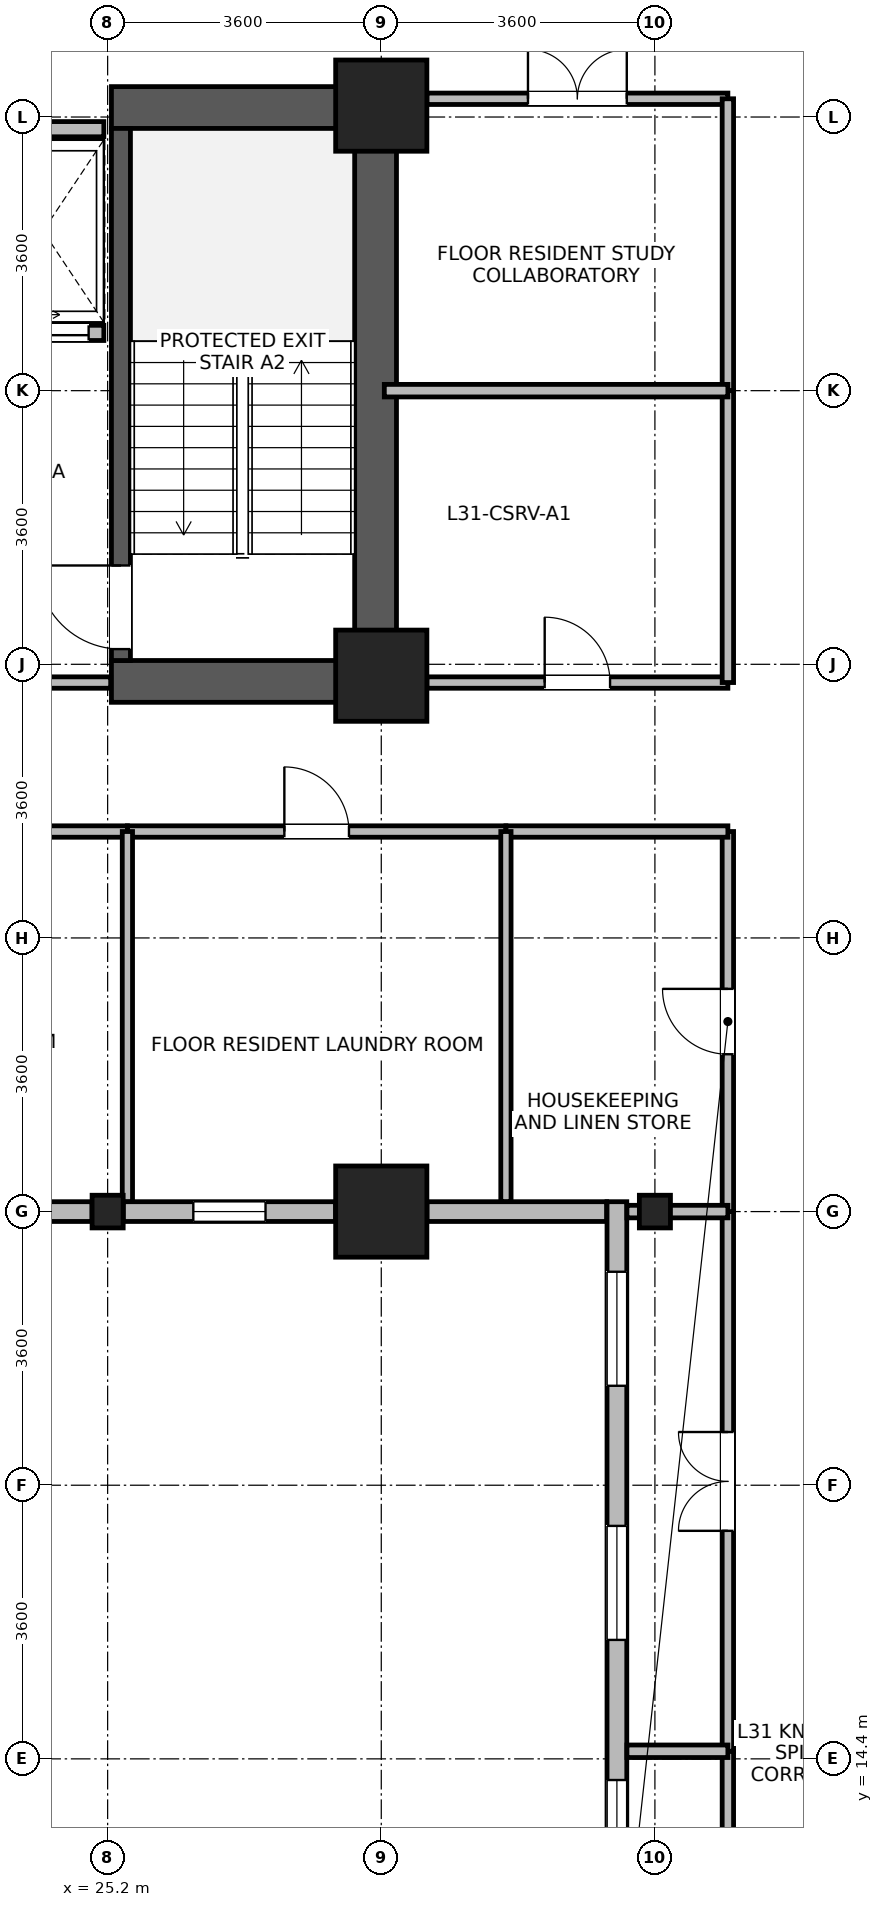
"""IFC4 building model, lengths in metres.
Left out: names, types, materials, properties, quantities, classifications, styles, units other than length and angle.
Written with IfcOpenShell. Run it as: python <this file> out.ifc"""

import sys

from ifc_helpers import new_model, si_unit, direction, frame, frame_2d, origin, origin_2d, place, context, subcontext, project, spatial, rectangle, i_section, extrude, source, transform, mapped, element, fill, save


model = new_model("IFC4")
c1 = context("Model", 3, precision=1e-05, world=origin(), true_north=direction((0.0, 1.0)))
c2 = subcontext(c1, "Body", "Model", "MODEL_VIEW")
j1 = project(units=[si_unit("LENGTHUNIT", "METRE"), si_unit("PLANEANGLEUNIT", "RADIAN")], contexts=[c1])
p1 = place(None, origin())
s1 = spatial("IfcSite", under=j1, at=p1, CompositionType="ELEMENT")
p2 = place(p1, origin())
s2 = spatial("IfcBuilding", under=s1, at=p2, CompositionType="ELEMENT")
p3 = place(p2, frame((0.0, 0.0, 123.0)))
s3 = spatial("IfcBuildingStorey", under=s2, at=p3, CompositionType="ELEMENT", Elevation=123.0)
p4 = place(p3, frame((28.725, 28.3, 0.0), z_axis=(0.0, 0.0, 1.0), x_axis=(0.0, 1.0, 0.0)))
e1 = element("IfcWall", 1, at=p4, inside=s3, PredefinedType="SHEAR", context=c2, shape_type="SweptSolid", body=[
    extrude(rectangle(XDim=8.1, YDim=0.55, at=frame_2d((4.05, 0.0))), origin(), (0.0, 0.0, 1.0), 3.45),
])
for number, where, z_axis, x_axis in (
    (2, (25.25, 28.575, 0.0), (0.0, 0.0, 1.0), (1.0, 0.0, 0.0)),
    (3, (25.25, 36.125, 0.0), (0.0, 0.0, 1.0), (1.0, 0.0, 0.0)),
):
    element("IfcWall", number, at=place(p3, frame(where, z_axis=z_axis, x_axis=x_axis)), inside=s3, PredefinedType="SHEAR", context=c2, shape_type="SweptSolid", body=[
        extrude(rectangle(XDim=3.2, YDim=0.55, at=frame_2d((1.6, 0.0))), origin(), (0.0, 0.0, 1.0), 3.45),
    ])
p5 = place(p3, frame((25.375, 28.85, 0.0), z_axis=(0.0, 0.0, 1.0), x_axis=(0.0, 1.0, 0.0)))
e4 = element("IfcWall", 4, at=p5, inside=s3, PredefinedType="SHEAR", context=c2, shape_type="SweptSolid", body=[
    extrude(rectangle(XDim=7.0, YDim=0.25, at=frame_2d((3.5, 0.0))), origin(), (0.0, 0.0, 1.0), 3.45),
])
p6 = place(p5, frame((0.15, 0.0, 0.0)))
e5 = element("IfcOpeningElement", 5, at=p6, cuts=e4, PredefinedType="OPENING", context=c2, shape_type="SweptSolid", body=[
    extrude(rectangle(XDim=1.1, YDim=2.08, at=frame_2d((0.55, 1.04))), frame((0.0, 0.135, 0.0), z_axis=(0.0, -1.0, 0.0), x_axis=(1.0, 0.0, 0.0)), (0.0, 0.0, 1.0), 0.27),
])
m1 = source(origin(), c2, "Body", "SweptSolid", [
    extrude(rectangle(XDim=1.2, YDim=1.2, at=origin_2d()), origin(), (0.0, 0.0, 1.0), 3.7),
])
for number, where, z_axis, x_axis in (
    (6, (28.8, 21.6, 0.0), (0.0, 0.0, 1.0), (1.0, 0.0, 0.0)),
    (7, (28.8, 28.65, 0.0), (0.0, 0.0, 1.0), (1.0, 0.0, 0.0)),
    (8, (28.8, 36.15, 0.0), (0.0, 0.0, 1.0), (1.0, 0.0, 0.0)),
):
    element("IfcColumn", number, at=place(p3, frame(where, z_axis=z_axis, x_axis=x_axis)), inside=s3, PredefinedType="COLUMN", context=c2, shape_type="MappedRepresentation", body=[
        mapped(m1, transform((0.0, 0.0, 0.0), x_axis=(1.0, 0.0, 0.0), y_axis=(0.0, 1.0, 0.0), z_axis=(0.0, 0.0, 1.0), scale=1.0)),
    ])
m2 = source(origin(), c2, "Body", "SweptSolid", [
    extrude(i_section(OverallWidth=0.409, OverallDepth=0.43, WebThickness=0.024, FlangeThickness=0.033, FilletRadius=0.015, at=origin_2d()), origin(), (0.0, 0.0, 1.0), 3.7),
])
for number, where, z_axis, x_axis in (
    (9, (25.2, 21.6, 0.0), (0.0, 0.0, 1.0), (1.0, 0.0, 0.0)),
    (10, (32.4, 21.6, 0.0), (0.0, 0.0, 1.0), (1.0, 0.0, 0.0)),
):
    element("IfcColumn", number, at=place(p3, frame(where, z_axis=z_axis, x_axis=x_axis)), inside=s3, PredefinedType="COLUMN", context=c2, shape_type="MappedRepresentation", body=[
        mapped(m2, transform((0.0, 0.0, 0.0), x_axis=(1.0, 0.0, 0.0), y_axis=(0.0, 1.0, 0.0), z_axis=(0.0, 0.0, 1.0), scale=1.0)),
    ])
p7 = place(p3, frame((24.994, 21.6, 0.0), z_axis=(0.0, 0.0, 1.0), x_axis=(-1.0, 0.0, 0.0)))
e11 = element("IfcWall", 11, at=p7, inside=s3, PredefinedType="STANDARD", context=c2, shape_type="SweptSolid", body=[
    extrude(rectangle(XDim=2.793, YDim=0.26, at=frame_2d((1.397, 0.0))), origin(), (0.0, 0.0, 1.0), 2.98),
])
p8 = place(p7, frame((0.922, 0.0, 0.85)))
e12 = element("IfcOpeningElement", 12, at=p8, cuts=e11, PredefinedType="OPENING", context=c2, shape_type="SweptSolid", body=[
    extrude(rectangle(XDim=0.95, YDim=1.75, at=frame_2d((0.475, 0.875))), frame((0.0, 0.14, 0.0), z_axis=(0.0, -1.0, 0.0), x_axis=(1.0, 0.0, 0.0)), (0.0, 0.0, 1.0), 0.28),
])
p9 = place(p3, frame((28.199, 21.6, 0.0), z_axis=(0.0, 0.0, 1.0), x_axis=(-1.0, 0.0, 0.0)))
e13 = element("IfcWall", 13, at=p9, inside=s3, PredefinedType="STANDARD", context=c2, shape_type="SweptSolid", body=[
    extrude(rectangle(XDim=2.793, YDim=0.26, at=frame_2d((1.397, 0.0))), origin(), (0.0, 0.0, 1.0), 2.98),
])
p10 = place(p9, frame((0.922, 0.0, 0.85)))
e14 = element("IfcOpeningElement", 14, at=p10, cuts=e13, PredefinedType="OPENING", context=c2, shape_type="SweptSolid", body=[
    extrude(rectangle(XDim=0.95, YDim=1.75, at=frame_2d((0.475, 0.875))), frame((0.0, 0.14, 0.0), z_axis=(0.0, -1.0, 0.0), x_axis=(1.0, 0.0, 0.0)), (0.0, 0.0, 1.0), 0.28),
])
p11 = place(p3, frame((31.765, 21.6, 0.0), z_axis=(0.0, 0.0, 1.0), x_axis=(-1.0, 0.0, 0.0)))
e15 = element("IfcWall", 15, at=p11, inside=s3, PredefinedType="STANDARD", context=c2, shape_type="SweptSolid", body=[
    extrude(rectangle(XDim=2.364, YDim=0.26, at=frame_2d((1.182, 0.0))), origin(), (0.0, 0.0, 1.0), 2.98),
])
p12 = place(p3, frame((31.9, 1.67, 0.0), z_axis=(0.0, 0.0, 1.0), x_axis=(0.0, 1.0, 0.0)))
e16 = element("IfcWall", 16, at=p12, inside=s3, PredefinedType="STANDARD", context=c2, shape_type="SweptSolid", body=[
    extrude(rectangle(XDim=20.06, YDim=0.26, at=frame_2d((10.03, 0.0))), origin(), (0.0, 0.0, 1.0), 3.43),
])
p13 = place(p12, frame((0.922, 0.0, 0.85)))
e17 = element("IfcOpeningElement", 17, at=p13, cuts=e16, PredefinedType="OPENING", context=c2, shape_type="SweptSolid", body=[
    extrude(rectangle(XDim=1.5, YDim=1.85, at=frame_2d((0.75, 0.925))), frame((0.0, 0.14, 0.0), z_axis=(0.0, -1.0, 0.0), x_axis=(1.0, 0.0, 0.0)), (0.0, 0.0, 1.0), 0.28),
])
p14 = place(p12, frame((7.608, 0.0, 0.85)))
e18 = element("IfcOpeningElement", 18, at=p14, cuts=e16, PredefinedType="OPENING", context=c2, shape_type="SweptSolid", body=[
    extrude(rectangle(XDim=1.5, YDim=1.85, at=frame_2d((0.75, 0.925))), frame((0.0, 0.14, 0.0), z_axis=(0.0, -1.0, 0.0), x_axis=(1.0, 0.0, 0.0)), (0.0, 0.0, 1.0), 0.28),
])
p15 = place(p12, frame((10.952, 0.0, 0.85)))
e19 = element("IfcOpeningElement", 19, at=p15, cuts=e16, PredefinedType="OPENING", context=c2, shape_type="SweptSolid", body=[
    extrude(rectangle(XDim=1.5, YDim=1.85, at=frame_2d((0.75, 0.925))), frame((0.0, 0.14, 0.0), z_axis=(0.0, -1.0, 0.0), x_axis=(1.0, 0.0, 0.0)), (0.0, 0.0, 1.0), 0.28),
])
p16 = place(p12, frame((14.295, 0.0, 0.85)))
e20 = element("IfcOpeningElement", 20, at=p16, cuts=e16, PredefinedType="OPENING", context=c2, shape_type="SweptSolid", body=[
    extrude(rectangle(XDim=1.5, YDim=1.85, at=frame_2d((0.75, 0.925))), frame((0.0, 0.14, 0.0), z_axis=(0.0, -1.0, 0.0), x_axis=(1.0, 0.0, 0.0)), (0.0, 0.0, 1.0), 0.28),
])
p17 = place(p12, frame((17.638, 0.0, 0.85)))
e21 = element("IfcOpeningElement", 21, at=p17, cuts=e16, PredefinedType="OPENING", context=c2, shape_type="SweptSolid", body=[
    extrude(rectangle(XDim=1.5, YDim=1.85, at=frame_2d((0.75, 0.925))), frame((0.0, 0.14, 0.0), z_axis=(0.0, -1.0, 0.0), x_axis=(1.0, 0.0, 0.0)), (0.0, 0.0, 1.0), 0.28),
])
p18 = place(p3, frame((23.55, 33.16, 0.0), z_axis=(0.0, 0.0, 1.0), x_axis=(1.0, 0.0, 0.0)))
e22 = element("IfcWall", 22, at=p18, inside=s3, PredefinedType="PARTITIONING", context=c2, shape_type="SweptSolid", body=[
    extrude(rectangle(XDim=1.6, YDim=0.2, at=frame_2d((0.8, 0.0))), origin(), (0.0, 0.0, 1.0), 3.43),
])
p19 = place(p18, frame((0.2, 0.0, 0.0)))
e23 = element("IfcOpeningElement", 23, at=p19, cuts=e22, PredefinedType="OPENING", context=c2, shape_type="SweptSolid", body=[
    extrude(rectangle(XDim=1.2, YDim=2.12, at=frame_2d((0.6, 1.06))), frame((0.0, 0.11, 0.0), z_axis=(0.0, -1.0, 0.0), x_axis=(1.0, 0.0, 0.0)), (0.0, 0.0, 1.0), 0.22),
])
p20 = place(p3, frame((23.55, 35.84, 0.0), z_axis=(0.0, 0.0, 1.0), x_axis=(1.0, 0.0, 0.0)))
e24 = element("IfcWall", 24, at=p20, inside=s3, PredefinedType="PARTITIONING", context=c2, shape_type="SweptSolid", body=[
    extrude(rectangle(XDim=1.6, YDim=0.2, at=frame_2d((0.8, 0.0))), origin(), (0.0, 0.0, 1.0), 2.43),
])
p21 = place(p3, frame((33.36, 7.24, 0.0), z_axis=(0.0, 0.0, 1.0), x_axis=(0.0, 1.0, 0.0)))
e25 = element("IfcWall", 25, at=p21, inside=s3, PredefinedType="PARTITIONING", context=c2, shape_type="SweptSolid", body=[
    extrude(rectangle(XDim=7.26, YDim=0.15, at=frame_2d((3.63, 0.0))), origin(), (0.0, 0.0, 1.0), 3.43),
])
p22 = place(p21, frame((2.98, 0.0, 0.0)))
e26 = element("IfcOpeningElement", 26, at=p22, cuts=e25, PredefinedType="OPENING", context=c2, shape_type="SweptSolid", body=[
    extrude(rectangle(XDim=1.3, YDim=2.12, at=frame_2d((0.65, 1.06))), frame((0.0, 0.085, 0.0), z_axis=(0.0, -1.0, 0.0), x_axis=(1.0, 0.0, 0.0)), (0.0, 0.0, 1.0), 0.17),
])
p23 = place(p3, frame((33.36, 14.5, 0.0), z_axis=(0.0, 0.0, 1.0), x_axis=(0.0, 1.0, 0.0)))
e27 = element("IfcWall", 27, at=p23, inside=s3, PredefinedType="PARTITIONING", context=c2, shape_type="SweptSolid", body=[
    extrude(rectangle(XDim=7.1, YDim=0.15, at=frame_2d((3.55, 0.0))), origin(), (0.0, 0.0, 1.0), 3.43),
])
p24 = place(p23, frame((2.9, 0.0, 0.0)))
e28 = element("IfcOpeningElement", 28, at=p24, cuts=e27, PredefinedType="OPENING", context=c2, shape_type="SweptSolid", body=[
    extrude(rectangle(XDim=1.3, YDim=2.12, at=frame_2d((0.65, 1.06))), frame((0.0, 0.085, 0.0), z_axis=(0.0, -1.0, 0.0), x_axis=(1.0, 0.0, 0.0)), (0.0, 0.0, 1.0), 0.17),
])
p25 = place(p3, frame((19.12, 26.6, 0.0), z_axis=(0.0, 0.0, 1.0), x_axis=(1.0, 0.0, 0.0)))
e29 = element("IfcWall", 29, at=p25, inside=s3, PredefinedType="PARTITIONING", context=c2, shape_type="SweptSolid", body=[
    extrude(rectangle(XDim=6.34, YDim=0.15, at=frame_2d((3.17, 0.0))), origin(), (0.0, 0.0, 1.0), 3.43),
])
p26 = place(p25, frame((2.52, 0.0, 0.0)))
e30 = element("IfcOpeningElement", 30, at=p26, cuts=e29, PredefinedType="OPENING", context=c2, shape_type="SweptSolid", body=[
    extrude(rectangle(XDim=1.3, YDim=2.12, at=frame_2d((0.65, 1.06))), frame((0.0, 0.085, 0.0), z_axis=(0.0, -1.0, 0.0), x_axis=(1.0, 0.0, 0.0)), (0.0, 0.0, 1.0), 0.17),
])
p27 = place(p3, frame((33.36, 21.6, 0.0), z_axis=(0.0, 0.0, 1.0), x_axis=(0.0, 1.0, 0.0)))
e31 = element("IfcWall", 31, at=p27, inside=s3, PredefinedType="PARTITIONING", context=c2, shape_type="SweptSolid", body=[
    extrude(rectangle(XDim=5.0, YDim=0.15, at=frame_2d((2.5, 0.0))), origin(), (0.0, 0.0, 1.0), 3.43),
])
p28 = place(p27, frame((2.07, 0.0, 0.0)))
e32 = element("IfcOpeningElement", 32, at=p28, cuts=e31, PredefinedType="OPENING", context=c2, shape_type="SweptSolid", body=[
    extrude(rectangle(XDim=0.86, YDim=2.02, at=frame_2d((0.43, 1.01))), frame((0.0, 0.085, 0.0), z_axis=(0.0, -1.0, 0.0), x_axis=(1.0, 0.0, 0.0)), (0.0, 0.0, 1.0), 0.17),
])
p29 = place(p3, frame((25.46, 26.6, 0.0), z_axis=(0.0, 0.0, 1.0), x_axis=(1.0, 0.0, 0.0)))
e33 = element("IfcWall", 33, at=p29, inside=s3, PredefinedType="PARTITIONING", context=c2, shape_type="SweptSolid", body=[
    extrude(rectangle(XDim=4.98, YDim=0.15, at=frame_2d((2.49, 0.0))), origin(), (0.0, 0.0, 1.0), 3.43),
])
p30 = place(p29, frame((2.065, 0.0, 0.0)))
e34 = element("IfcOpeningElement", 34, at=p30, cuts=e33, PredefinedType="OPENING", context=c2, shape_type="SweptSolid", body=[
    extrude(rectangle(XDim=0.85, YDim=2.04, at=frame_2d((0.425, 1.02))), frame((0.0, 0.085, 0.0), z_axis=(0.0, -1.0, 0.0), x_axis=(1.0, 0.0, 0.0)), (0.0, 0.0, 1.0), 0.17),
])
p31 = place(p3, frame((29.4, 28.56, 0.0), z_axis=(0.0, 0.0, 1.0), x_axis=(1.0, 0.0, 0.0)))
e35 = element("IfcWall", 35, at=p31, inside=s3, PredefinedType="PARTITIONING", context=c2, shape_type="SweptSolid", body=[
    extrude(rectangle(XDim=3.96, YDim=0.15, at=frame_2d((1.98, 0.0))), origin(), (0.0, 0.0, 1.0), 2.78),
])
p32 = place(p31, frame((1.55, 0.0, 0.0)))
e36 = element("IfcOpeningElement", 36, at=p32, cuts=e35, PredefinedType="OPENING", context=c2, shape_type="SweptSolid", body=[
    extrude(rectangle(XDim=0.86, YDim=2.02, at=frame_2d((0.43, 1.01))), frame((0.0, 0.085, 0.0), z_axis=(0.0, -1.0, 0.0), x_axis=(1.0, 0.0, 0.0)), (0.0, 0.0, 1.0), 0.17),
])
p33 = place(p3, frame((29.4, 36.24, 0.0), z_axis=(0.0, 0.0, 1.0), x_axis=(1.0, 0.0, 0.0)))
e37 = element("IfcWall", 37, at=p33, inside=s3, PredefinedType="PARTITIONING", context=c2, shape_type="SweptSolid", body=[
    extrude(rectangle(XDim=3.96, YDim=0.15, at=frame_2d((1.98, 0.0))), origin(), (0.0, 0.0, 1.0), 2.78),
])
p34 = place(p33, frame((1.33, 0.0, 0.0)))
e38 = element("IfcOpeningElement", 38, at=p34, cuts=e37, PredefinedType="OPENING", context=c2, shape_type="SweptSolid", body=[
    extrude(rectangle(XDim=1.3, YDim=2.12, at=frame_2d((0.65, 1.06))), frame((0.0, 0.085, 0.0), z_axis=(0.0, -1.0, 0.0), x_axis=(1.0, 0.0, 0.0)), (0.0, 0.0, 1.0), 0.17),
])
p35 = place(p3, frame((33.36, 32.4, 0.0), z_axis=(0.0, 0.0, 1.0), x_axis=(0.0, 1.0, 0.0)))
e39 = element("IfcWall", 39, at=p35, inside=s3, PredefinedType="PARTITIONING", context=c2, shape_type="SweptSolid", body=[
    extrude(rectangle(XDim=3.84, YDim=0.15, at=frame_2d((1.92, 0.0))), origin(), (0.0, 0.0, 1.0), 3.43),
])
p36 = place(p3, frame((33.36, 28.56, 0.0), z_axis=(0.0, 0.0, 1.0), x_axis=(0.0, 1.0, 0.0)))
e40 = element("IfcWall", 40, at=p36, inside=s3, PredefinedType="PARTITIONING", context=c2, shape_type="SweptSolid", body=[
    extrude(rectangle(XDim=3.84, YDim=0.15, at=frame_2d((1.92, 0.0))), origin(), (0.0, 0.0, 1.0), 3.43),
])
p37 = place(p3, frame((30.44, 26.6, 0.0), z_axis=(0.0, 0.0, 1.0), x_axis=(1.0, 0.0, 0.0)))
e41 = element("IfcWall", 41, at=p37, inside=s3, PredefinedType="PARTITIONING", context=c2, shape_type="SweptSolid", body=[
    extrude(rectangle(XDim=2.92, YDim=0.15, at=frame_2d((1.46, 0.0))), origin(), (0.0, 0.0, 1.0), 3.43),
])
for number, where, z_axis, x_axis in (
    (42, (25.46, 21.732, 0.0), (0.0, 0.0, 1.0), (0.0, 1.0, 0.0)),
    (43, (30.44, 21.732, 0.0), (0.0, 0.0, 1.0), (0.0, 1.0, 0.0)),
):
    element("IfcWall", number, at=place(p3, frame(where, z_axis=z_axis, x_axis=x_axis)), inside=s3, PredefinedType="PARTITIONING", context=c2, shape_type="SweptSolid", body=[
        extrude(rectangle(XDim=4.868, YDim=0.135, at=frame_2d((2.434, 0.0))), origin(), (0.0, 0.0, 1.0), 3.43),
    ])
p38 = place(p3, frame((28.84, 32.4, 0.0), z_axis=(0.0, 0.0, 1.0), x_axis=(1.0, 0.0, 0.0)))
e44 = element("IfcWall", 44, at=p38, inside=s3, PredefinedType="PARTITIONING", context=c2, shape_type="SweptSolid", body=[
    extrude(rectangle(XDim=4.52, YDim=0.165, at=frame_2d((2.26, 0.0))), origin(), (0.0, 0.0, 1.0), 3.43),
])
p39 = place(p3, frame((21.76, 28.56, 0.0), z_axis=(0.0, 0.0, 1.0), x_axis=(1.0, 0.0, 0.0)))
e45 = element("IfcWall", 45, at=p39, inside=s3, PredefinedType="PARTITIONING", context=c2, shape_type="SweptSolid", body=[
    extrude(rectangle(XDim=3.48, YDim=0.15, at=frame_2d((1.74, 0.0))), origin(), (0.0, 0.0, 1.0), 2.43),
])
p40 = place(p3, frame((32.032, 14.5, 0.0), z_axis=(0.0, 0.0, 1.0), x_axis=(1.0, 0.0, 0.0)))
e46 = element("IfcWall", 46, at=p40, inside=s3, PredefinedType="PARTITIONING", context=c2, shape_type="SweptSolid", body=[
    extrude(rectangle(XDim=1.328, YDim=0.165, at=frame_2d((0.664, 0.0))), origin(), (0.0, 0.0, 1.0), 3.43),
])
p41 = place(p3, frame((32.032, 21.6, 0.0), z_axis=(0.0, 0.0, 1.0), x_axis=(1.0, 0.0, 0.0)))
e47 = element("IfcWall", 47, at=p41, inside=s3, PredefinedType="PARTITIONING", context=c2, shape_type="SweptSolid", body=[
    extrude(rectangle(XDim=1.328, YDim=0.165, at=frame_2d((0.664, 0.0))), origin(), (0.0, 0.0, 1.0), 2.98),
])
p42 = place(p10, origin())
e48 = element("IfcWindow", 48, at=p42, inside=s3, PartitioningType="SINGLE_PANEL", PredefinedType="WINDOW", context=c2, shape_type="SweptSolid", body=[
    extrude(rectangle(XDim=0.95, YDim=1.75, at=frame_2d((0.475, 0.875))), frame((0.0, 0.03, 0.0), z_axis=(0.0, -1.0, 0.0), x_axis=(1.0, 0.0, 0.0)), (0.0, 0.0, 1.0), 0.06),
])
fill(e14, e48)
p43 = place(p15, origin())
e49 = element("IfcWindow", 49, at=p43, inside=s3, PartitioningType="SINGLE_PANEL", PredefinedType="WINDOW", context=c2, shape_type="SweptSolid", body=[
    extrude(rectangle(XDim=1.5, YDim=1.85, at=frame_2d((0.75, 0.925))), frame((0.0, 0.03, 0.0), z_axis=(0.0, -1.0, 0.0), x_axis=(1.0, 0.0, 0.0)), (0.0, 0.0, 1.0), 0.06),
])
fill(e19, e49)
p44 = place(p16, origin())
e50 = element("IfcWindow", 50, at=p44, inside=s3, PartitioningType="SINGLE_PANEL", PredefinedType="WINDOW", context=c2, shape_type="SweptSolid", body=[
    extrude(rectangle(XDim=1.5, YDim=1.85, at=frame_2d((0.75, 0.925))), frame((0.0, 0.03, 0.0), z_axis=(0.0, -1.0, 0.0), x_axis=(1.0, 0.0, 0.0)), (0.0, 0.0, 1.0), 0.06),
])
fill(e20, e50)
p45 = place(p17, origin())
e51 = element("IfcWindow", 51, at=p45, inside=s3, PartitioningType="SINGLE_PANEL", PredefinedType="WINDOW", context=c2, shape_type="SweptSolid", body=[
    extrude(rectangle(XDim=1.5, YDim=1.85, at=frame_2d((0.75, 0.925))), frame((0.0, 0.03, 0.0), z_axis=(0.0, -1.0, 0.0), x_axis=(1.0, 0.0, 0.0)), (0.0, 0.0, 1.0), 0.06),
])
fill(e21, e51)
p46 = place(p6, origin())
e52 = element("IfcDoor", 52, at=p46, inside=s3, OperationType="SINGLE_SWING_RIGHT", PredefinedType="DOOR", context=c2, shape_type="SweptSolid", body=[
    extrude(rectangle(XDim=1.1, YDim=2.08, at=frame_2d((0.55, 1.04))), frame((0.0, 0.025, 0.0), z_axis=(0.0, -1.0, 0.0), x_axis=(1.0, 0.0, 0.0)), (0.0, 0.0, 1.0), 0.05),
])
fill(e5, e52)
p47 = place(p19, origin())
e53 = element("IfcDoor", 53, at=p47, inside=s3, OperationType="SLIDING_TO_RIGHT", PredefinedType="DOOR", context=c2, shape_type="SweptSolid", body=[
    extrude(rectangle(XDim=1.2, YDim=2.12, at=frame_2d((0.6, 1.06))), frame((0.0, 0.025, 0.0), z_axis=(0.0, -1.0, 0.0), x_axis=(1.0, 0.0, 0.0)), (0.0, 0.0, 1.0), 0.05),
])
fill(e23, e53)
p48 = place(p24, origin())
e54 = element("IfcDoor", 54, at=p48, inside=s3, OperationType="DOUBLE_DOOR_SINGLE_SWING", PredefinedType="DOOR", context=c2, shape_type="SweptSolid", body=[
    extrude(rectangle(XDim=1.3, YDim=2.12, at=frame_2d((0.65, 1.06))), frame((0.0, 0.025, 0.0), z_axis=(0.0, -1.0, 0.0), x_axis=(1.0, 0.0, 0.0)), (0.0, 0.0, 1.0), 0.05),
])
fill(e28, e54)
p49 = place(p28, origin())
e55 = element("IfcDoor", 55, at=p49, inside=s3, OperationType="SINGLE_SWING_RIGHT", PredefinedType="DOOR", context=c2, shape_type="SweptSolid", body=[
    extrude(rectangle(XDim=0.86, YDim=2.02, at=frame_2d((0.43, 1.01))), frame((0.0, 0.025, 0.0), z_axis=(0.0, -1.0, 0.0), x_axis=(1.0, 0.0, 0.0)), (0.0, 0.0, 1.0), 0.05),
])
fill(e32, e55)
p50 = place(p30, origin())
e56 = element("IfcDoor", 56, at=p50, inside=s3, OperationType="SINGLE_SWING_LEFT", PredefinedType="DOOR", context=c2, shape_type="SweptSolid", body=[
    extrude(rectangle(XDim=0.85, YDim=2.04, at=frame_2d((0.425, 1.02))), frame((0.0, 0.025, 0.0), z_axis=(0.0, -1.0, 0.0), x_axis=(1.0, 0.0, 0.0)), (0.0, 0.0, 1.0), 0.05),
])
fill(e34, e56)
p51 = place(p32, origin())
e57 = element("IfcDoor", 57, at=p51, inside=s3, OperationType="SINGLE_SWING_LEFT", PredefinedType="DOOR", context=c2, shape_type="SweptSolid", body=[
    extrude(rectangle(XDim=0.86, YDim=2.02, at=frame_2d((0.43, 1.01))), frame((0.0, 0.025, 0.0), z_axis=(0.0, -1.0, 0.0), x_axis=(1.0, 0.0, 0.0)), (0.0, 0.0, 1.0), 0.05),
])
fill(e36, e57)
p52 = place(p34, origin())
e58 = element("IfcDoor", 58, at=p52, inside=s3, OperationType="DOUBLE_DOOR_SINGLE_SWING", PredefinedType="DOOR", context=c2, shape_type="SweptSolid", body=[
    extrude(rectangle(XDim=1.3, YDim=2.12, at=frame_2d((0.65, 1.06))), frame((0.0, 0.025, 0.0), z_axis=(0.0, -1.0, 0.0), x_axis=(1.0, 0.0, 0.0)), (0.0, 0.0, 1.0), 0.05),
])
fill(e38, e58)
save(model, sys.argv[1])
